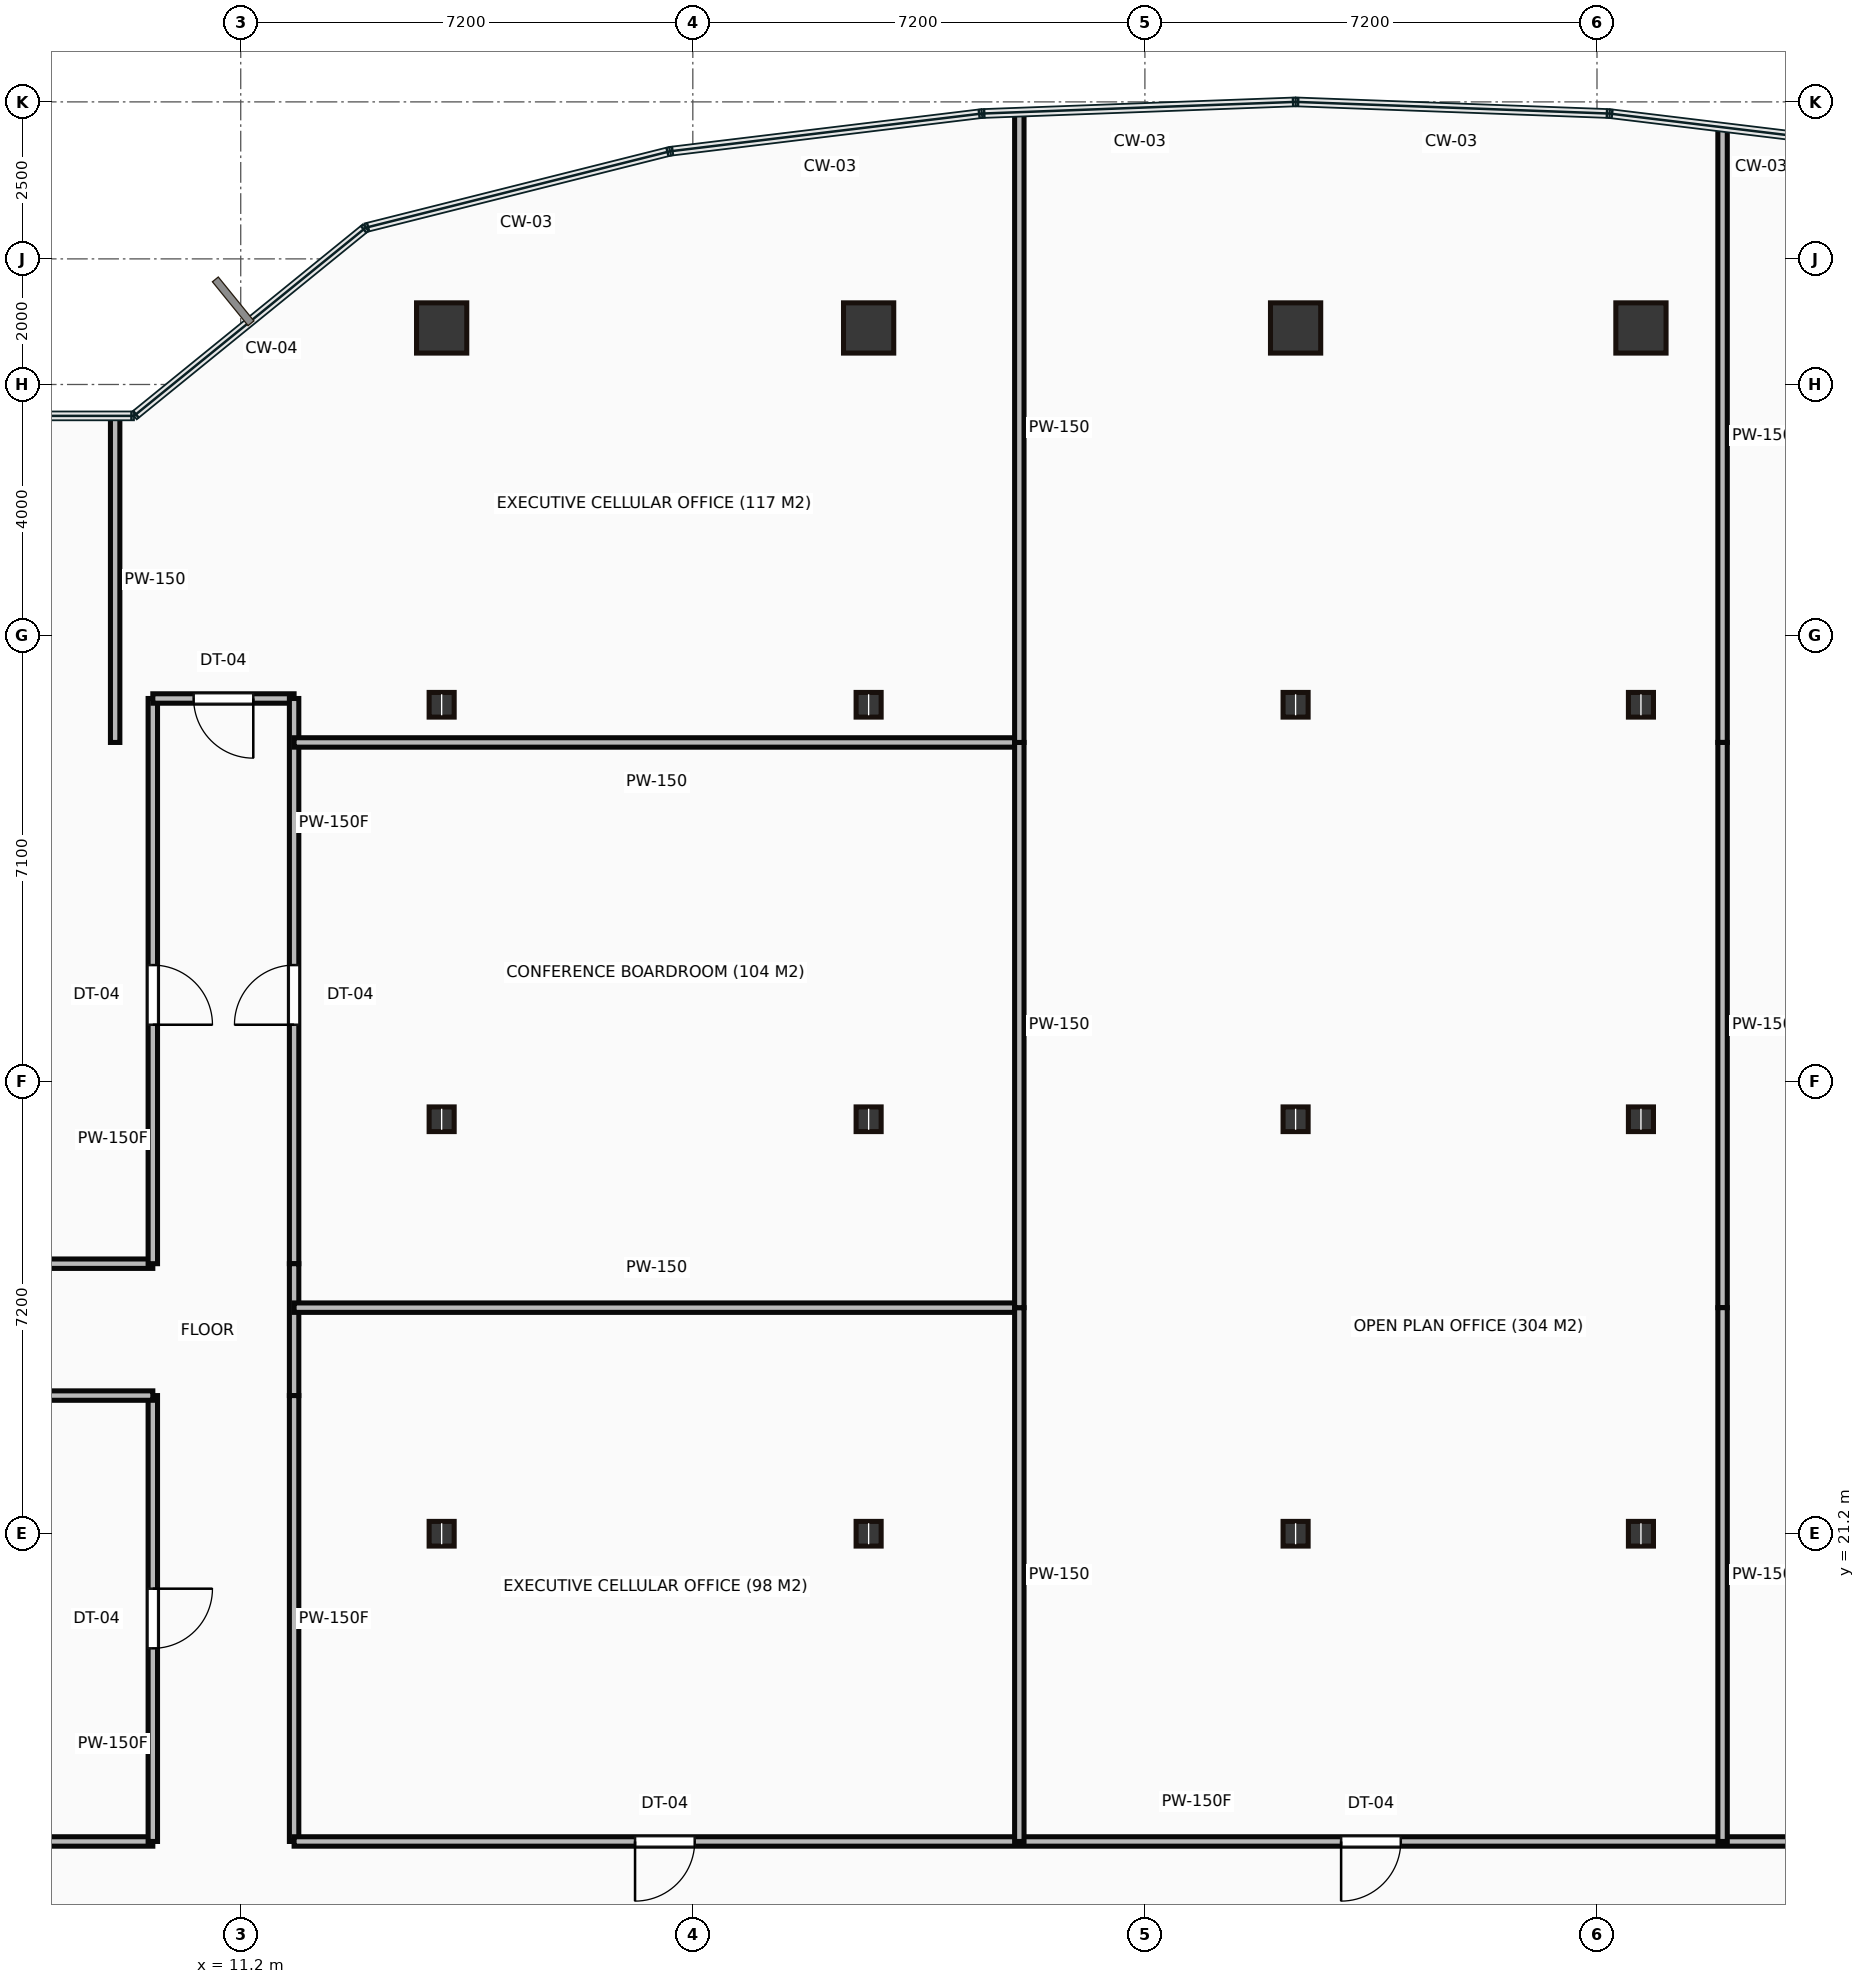
"""IFC4 building model, lengths in metres.
Left out: names, types, materials, properties, quantities, classifications, styles, units other than length and angle.
Written with IfcOpenShell. Run it as: python <this file> out.ifc"""

import sys

from ifc_helpers import new_model, si_unit, direction, frame, frame_2d, origin, origin_2d, place, context, subcontext, project, spatial, rectangle, hollow_rectangle, i_section, extrude, source, transform, mapped, element, fill, save


model = new_model("IFC4")
c1 = context("Model", 3, precision=1e-05, world=origin(), true_north=direction((0.0, 1.0)))
c2 = subcontext(c1, "Body", "Model", "MODEL_VIEW")
j1 = project(units=[si_unit("LENGTHUNIT", "METRE"), si_unit("PLANEANGLEUNIT", "RADIAN")], contexts=[c1])
p1 = place(None, origin())
s1 = spatial("IfcSite", under=j1, at=p1, CompositionType="ELEMENT")
p2 = place(p1, origin())
s2 = spatial("IfcBuilding", under=s1, at=p2, CompositionType="ELEMENT")
p3 = place(p2, frame((0.0, 0.0, 106.9)))
s3 = spatial("IfcBuildingStorey", under=s2, at=p3, CompositionType="ELEMENT", Elevation=106.9)
m1 = source(origin(), c2, "Body", "SweptSolid", [
    extrude(i_section(OverallWidth=0.399, OverallDepth=0.393, WebThickness=0.023, FlangeThickness=0.037, at=origin_2d()), origin(), (0.0, 0.0, 1.0), 3.65),
])
for number, where, z_axis, x_axis in (
    (1, (14.4, 21.2, 0.0), (0.0, 0.0, 1.0), (1.0, 0.0, 0.0)),
    (2, (14.4, 27.8, 0.0), (0.0, 0.0, 1.0), (1.0, 0.0, 0.0)),
    (3, (14.4, 34.4, 0.0), (0.0, 0.0, 1.0), (1.0, 0.0, 0.0)),
):
    element("IfcColumn", number, at=place(p3, frame(where, z_axis=z_axis, x_axis=x_axis)), inside=s3, PredefinedType="COLUMN", context=c2, shape_type="MappedRepresentation", body=[
        mapped(m1, transform((0.0, 0.0, 0.0))),
    ])
m2 = source(origin(), c2, "Body", "SweptSolid", [
    extrude(hollow_rectangle(XDim=0.8, YDim=0.8, WallThickness=0.04, at=origin_2d()), origin(), (0.0, 0.0, 1.0), 3.65),
])
p4 = place(p3, frame((14.4, 40.4, 0.0), z_axis=(0.0, 0.0, 1.0), x_axis=(1.0, 0.0, 0.0)))
e4 = element("IfcColumn", 4, at=p4, inside=s3, PredefinedType="COLUMN", context=c2, shape_type="MappedRepresentation", body=[
    mapped(m2, transform((0.0, 0.0, 0.0))),
])
for number, where, z_axis, x_axis in (
    (5, (21.2, 21.2, 0.0), (0.0, 0.0, 1.0), (1.0, 0.0, 0.0)),
    (6, (21.2, 27.8, 0.0), (0.0, 0.0, 1.0), (1.0, 0.0, 0.0)),
    (7, (21.2, 34.4, 0.0), (0.0, 0.0, 1.0), (1.0, 0.0, 0.0)),
):
    element("IfcColumn", number, at=place(p3, frame(where, z_axis=z_axis, x_axis=x_axis)), inside=s3, PredefinedType="COLUMN", context=c2, shape_type="MappedRepresentation", body=[
        mapped(m1, transform((0.0, 0.0, 0.0))),
    ])
p5 = place(p3, frame((21.2, 40.4, 0.0), z_axis=(0.0, 0.0, 1.0), x_axis=(1.0, 0.0, 0.0)))
e8 = element("IfcColumn", 8, at=p5, inside=s3, PredefinedType="COLUMN", context=c2, shape_type="MappedRepresentation", body=[
    mapped(m2, transform((0.0, 0.0, 0.0))),
])
for number, where, z_axis, x_axis in (
    (9, (28.0, 21.2, 0.0), (0.0, 0.0, 1.0), (1.0, 0.0, 0.0)),
    (10, (28.0, 27.8, 0.0), (0.0, 0.0, 1.0), (1.0, 0.0, 0.0)),
    (11, (28.0, 34.4, 0.0), (0.0, 0.0, 1.0), (1.0, 0.0, 0.0)),
):
    element("IfcColumn", number, at=place(p3, frame(where, z_axis=z_axis, x_axis=x_axis)), inside=s3, PredefinedType="COLUMN", context=c2, shape_type="MappedRepresentation", body=[
        mapped(m1, transform((0.0, 0.0, 0.0))),
    ])
p6 = place(p3, frame((28.0, 40.4, 0.0), z_axis=(0.0, 0.0, 1.0), x_axis=(1.0, 0.0, 0.0)))
e12 = element("IfcColumn", 12, at=p6, inside=s3, PredefinedType="COLUMN", context=c2, shape_type="MappedRepresentation", body=[
    mapped(m2, transform((0.0, 0.0, 0.0))),
])
for number, where, z_axis, x_axis in (
    (13, (33.5, 21.2, 0.0), (0.0, 0.0, 1.0), (1.0, 0.0, 0.0)),
    (14, (33.5, 27.8, 0.0), (0.0, 0.0, 1.0), (1.0, 0.0, 0.0)),
    (15, (33.5, 34.4, 0.0), (0.0, 0.0, 1.0), (1.0, 0.0, 0.0)),
):
    element("IfcColumn", number, at=place(p3, frame(where, z_axis=z_axis, x_axis=x_axis)), inside=s3, PredefinedType="COLUMN", context=c2, shape_type="MappedRepresentation", body=[
        mapped(m1, transform((0.0, 0.0, 0.0))),
    ])
p7 = place(p3, frame((33.5, 40.4, 0.0), z_axis=(0.0, 0.0, 1.0), x_axis=(1.0, 0.0, 0.0)))
e16 = element("IfcColumn", 16, at=p7, inside=s3, PredefinedType="COLUMN", context=c2, shape_type="MappedRepresentation", body=[
    mapped(m2, transform((0.0, 0.0, 0.0))),
])
m3 = source(origin(), c2, "Body", "SweptSolid", [
    extrude(rectangle(XDim=5.2, YDim=0.15, at=frame_2d((2.6, 0.0))), origin(), (0.0, 0.0, 1.0), 3.4),
])
p8 = place(p3, frame((4.6, 16.3, 0.0), z_axis=(0.0, 0.0, 1.0), x_axis=(1.0, 0.0, 0.0)))
e17 = element("IfcWall", 17, at=p8, inside=s3, PredefinedType="PARTITIONING", context=c2, shape_type="MappedRepresentation", body=[
    mapped(m3, transform((0.0, 0.0, 0.0))),
])
m4 = source(origin(), c2, "Body", "SweptSolid", [
    extrude(rectangle(XDim=7.1, YDim=0.15, at=frame_2d((3.55, 0.0))), origin(), (0.0, 0.0, 1.0), 3.4),
])
p9 = place(p3, frame((9.8, 16.3, 0.0), z_axis=(0.0, 0.0, 1.0), x_axis=(0.0, 1.0, 0.0)))
e18 = element("IfcWall", 18, at=p9, inside=s3, PredefinedType="PARTITIONING", context=c2, shape_type="MappedRepresentation", body=[
    mapped(m4, transform((0.0, 0.0, 0.0))),
])
p10 = place(p9, frame((3.075, 0.0, 0.0)))
e19 = element("IfcOpeningElement", 19, at=p10, cuts=e18, PredefinedType="OPENING", context=c2, shape_type="SweptSolid", body=[
    extrude(rectangle(XDim=0.95, YDim=2.15, at=frame_2d((0.475, 1.075))), frame((0.0, 0.085, 0.0), z_axis=(0.0, -1.0, 0.0), x_axis=(1.0, 0.0, 0.0)), (0.0, 0.0, 1.0), 0.17),
])
m5 = source(origin(), c2, "Body", "SweptSolid", [
    extrude(rectangle(XDim=5.2, YDim=0.15, at=frame_2d((2.6, 0.0))), origin(), (0.0, 0.0, 1.0), 2.988),
])
for number, where, z_axis, x_axis in (
    (20, (9.8, 23.4, 0.0), (0.0, 0.0, 1.0), (-1.0, 0.0, 0.0)),
    (21, (4.6, 25.5, 0.0), (0.0, 0.0, 1.0), (1.0, 0.0, 0.0)),
):
    element("IfcWall", number, at=place(p3, frame(where, z_axis=z_axis, x_axis=x_axis)), inside=s3, PredefinedType="PARTITIONING", context=c2, shape_type="MappedRepresentation", body=[
        mapped(m5, transform((0.0, 0.0, 0.0))),
    ])
m6 = source(origin(), c2, "Body", "SweptSolid", [
    extrude(rectangle(XDim=9.0, YDim=0.15, at=frame_2d((4.5, 0.0))), origin(), (0.0, 0.0, 1.0), 3.4),
])
p11 = place(p3, frame((9.8, 25.5, 0.0), z_axis=(0.0, 0.0, 1.0), x_axis=(0.0, 1.0, 0.0)))
e22 = element("IfcWall", 22, at=p11, inside=s3, PredefinedType="PARTITIONING", context=c2, shape_type="MappedRepresentation", body=[
    mapped(m6, transform((0.0, 0.0, 0.0))),
])
p12 = place(p11, frame((3.805, 0.0, 0.0)))
e23 = element("IfcOpeningElement", 23, at=p12, cuts=e22, PredefinedType="OPENING", context=c2, shape_type="SweptSolid", body=[
    extrude(rectangle(XDim=0.95, YDim=2.15, at=frame_2d((0.475, 1.075))), frame((0.0, 0.085, 0.0), z_axis=(0.0, -1.0, 0.0), x_axis=(1.0, 0.0, 0.0)), (0.0, 0.0, 1.0), 0.17),
])
m7 = source(origin(), c2, "Body", "SweptSolid", [
    extrude(rectangle(XDim=2.25, YDim=0.15, at=frame_2d((1.125, 0.0))), origin(), (0.0, 0.0, 1.0), 2.702),
])
p13 = place(p3, frame((9.8, 34.5, 0.0), z_axis=(0.0, 0.0, 1.0), x_axis=(1.0, 0.0, 0.0)))
e24 = element("IfcWall", 24, at=p13, inside=s3, PredefinedType="PARTITIONING", context=c2, shape_type="MappedRepresentation", body=[
    mapped(m7, transform((0.0, 0.0, 0.0))),
])
p14 = place(p13, frame((0.65, 0.0, 0.0)))
e25 = element("IfcOpeningElement", 25, at=p14, cuts=e24, PredefinedType="OPENING", context=c2, shape_type="SweptSolid", body=[
    extrude(rectangle(XDim=0.95, YDim=2.15, at=frame_2d((0.475, 1.075))), frame((0.0, 0.085, 0.0), z_axis=(0.0, -1.0, 0.0), x_axis=(1.0, 0.0, 0.0)), (0.0, 0.0, 1.0), 0.17),
])
p15 = place(p3, frame((12.05, 34.5, 0.0), z_axis=(0.0, 0.0, 1.0), x_axis=(0.0, -1.0, 0.0)))
e26 = element("IfcWall", 26, at=p15, inside=s3, PredefinedType="PARTITIONING", context=c2, shape_type="MappedRepresentation", body=[
    mapped(m6, transform((0.0, 0.0, 0.0))),
])
p16 = place(p15, frame((4.245, 0.0, 0.0)))
e27 = element("IfcOpeningElement", 27, at=p16, cuts=e26, PredefinedType="OPENING", context=c2, shape_type="SweptSolid", body=[
    extrude(rectangle(XDim=0.95, YDim=2.15, at=frame_2d((0.475, 1.075))), frame((0.0, 0.085, 0.0), z_axis=(0.0, -1.0, 0.0), x_axis=(1.0, 0.0, 0.0)), (0.0, 0.0, 1.0), 0.17),
])
m8 = source(origin(), c2, "Body", "SweptSolid", [
    extrude(rectangle(XDim=2.1, YDim=0.15, at=frame_2d((1.05, 0.0))), origin(), (0.0, 0.0, 1.0), 3.4),
])
p17 = place(p3, frame((12.05, 25.5, 0.0), z_axis=(0.0, 0.0, 1.0), x_axis=(0.0, -1.0, 0.0)))
e28 = element("IfcWall", 28, at=p17, inside=s3, PredefinedType="PARTITIONING", context=c2, shape_type="MappedRepresentation", body=[
    mapped(m8, transform((0.0, 0.0, 0.0))),
])
p18 = place(p3, frame((12.05, 23.4, 0.0), z_axis=(0.0, 0.0, 1.0), x_axis=(0.0, -1.0, 0.0)))
e29 = element("IfcWall", 29, at=p18, inside=s3, PredefinedType="PARTITIONING", context=c2, shape_type="MappedRepresentation", body=[
    mapped(m4, transform((0.0, 0.0, 0.0))),
])
m9 = source(origin(), c2, "Body", "SweptSolid", [
    extrude(rectangle(XDim=28.75, YDim=0.15, at=frame_2d((14.375, 0.0))), origin(), (0.0, 0.0, 1.0), 3.4),
])
p19 = place(p3, frame((12.05, 16.3, 0.0), z_axis=(0.0, 0.0, 1.0), x_axis=(1.0, 0.0, 0.0)))
e30 = element("IfcWall", 30, at=p19, inside=s3, PredefinedType="PARTITIONING", context=c2, shape_type="MappedRepresentation", body=[
    mapped(m9, transform((0.0, 0.0, 0.0))),
])
p20 = place(p19, frame((5.43, 0.0, 0.0)))
e31 = element("IfcOpeningElement", 31, at=p20, cuts=e30, PredefinedType="OPENING", context=c2, shape_type="SweptSolid", body=[
    extrude(rectangle(XDim=0.95, YDim=2.15, at=frame_2d((0.475, 1.075))), frame((0.0, 0.085, 0.0), z_axis=(0.0, -1.0, 0.0), x_axis=(1.0, 0.0, 0.0)), (0.0, 0.0, 1.0), 0.17),
])
p21 = place(p19, frame((16.675, 0.0, 0.0)))
e32 = element("IfcOpeningElement", 32, at=p21, cuts=e30, PredefinedType="OPENING", context=c2, shape_type="SweptSolid", body=[
    extrude(rectangle(XDim=0.95, YDim=2.15, at=frame_2d((0.475, 1.075))), frame((0.0, 0.085, 0.0), z_axis=(0.0, -1.0, 0.0), x_axis=(1.0, 0.0, 0.0)), (0.0, 0.0, 1.0), 0.17),
])
p22 = place(p19, frame((25.145, 0.0, 0.0)))
e33 = element("IfcOpeningElement", 33, at=p22, cuts=e30, PredefinedType="OPENING", context=c2, shape_type="SweptSolid", body=[
    extrude(rectangle(XDim=0.95, YDim=2.15, at=frame_2d((0.475, 1.075))), frame((0.0, 0.085, 0.0), z_axis=(0.0, -1.0, 0.0), x_axis=(1.0, 0.0, 0.0)), (0.0, 0.0, 1.0), 0.17),
])
m10 = source(origin(), c2, "Body", "SweptSolid", [
    extrude(rectangle(XDim=5.18, YDim=0.15, at=frame_2d((2.59, 0.0))), origin(), (0.0, 0.0, 1.0), 3.4),
])
p23 = place(p3, frame((9.2, 38.98, 0.0), z_axis=(0.0, 0.0, 1.0), x_axis=(0.0, -1.0, 0.0)))
e34 = element("IfcWall", 34, at=p23, inside=s3, PredefinedType="PARTITIONING", context=c2, shape_type="MappedRepresentation", body=[
    mapped(m10, transform((0.0, 0.0, 0.0))),
])
m11 = source(origin(), c2, "Body", "SweptSolid", [
    extrude(rectangle(XDim=11.55, YDim=0.15, at=frame_2d((5.775, 0.0))), origin(), (0.0, 0.0, 1.0), 3.4),
])
for number, where, z_axis, x_axis in (
    (35, (12.05, 24.8, 0.0), (0.0, 0.0, 1.0), (1.0, 0.0, 0.0)),
    (36, (23.6, 33.8, 0.0), (0.0, 0.0, 1.0), (-1.0, 0.0, 0.0)),
):
    element("IfcWall", number, at=place(p3, frame(where, z_axis=z_axis, x_axis=x_axis)), inside=s3, PredefinedType="PARTITIONING", context=c2, shape_type="MappedRepresentation", body=[
        mapped(m11, transform((0.0, 0.0, 0.0))),
    ])
m12 = source(origin(), c2, "Body", "SweptSolid", [
    extrude(rectangle(XDim=8.5, YDim=0.15, at=frame_2d((4.25, 0.0))), origin(), (0.0, 0.0, 1.0), 3.4),
])
p24 = place(p3, frame((23.6, 24.8, 0.0), z_axis=(0.0, 0.0, 1.0), x_axis=(0.0, -1.0, 0.0)))
e37 = element("IfcWall", 37, at=p24, inside=s3, PredefinedType="PARTITIONING", context=c2, shape_type="MappedRepresentation", body=[
    mapped(m12, transform((0.0, 0.0, 0.0))),
])
p25 = place(p3, frame((23.6, 33.8, 0.0), z_axis=(0.0, 0.0, 1.0), x_axis=(0.0, -1.0, 0.0)))
e38 = element("IfcWall", 38, at=p25, inside=s3, PredefinedType="PARTITIONING", context=c2, shape_type="MappedRepresentation", body=[
    mapped(m6, transform((0.0, 0.0, 0.0))),
])
m13 = source(origin(), c2, "Body", "SweptSolid", [
    extrude(rectangle(XDim=10.016, YDim=0.15, at=frame_2d((5.008, 0.0))), origin(), (0.0, 0.0, 1.0), 3.4),
])
p26 = place(p3, frame((23.6, 43.816, 0.0), z_axis=(0.0, 0.0, 1.0), x_axis=(0.0, -1.0, 0.0)))
e39 = element("IfcWall", 39, at=p26, inside=s3, PredefinedType="PARTITIONING", context=c2, shape_type="MappedRepresentation", body=[
    mapped(m13, transform((0.0, 0.0, 0.0))),
])
m14 = source(origin(), c2, "Body", "SweptSolid", [
    extrude(rectangle(XDim=9.776, YDim=0.15, at=frame_2d((4.888, 0.0))), origin(), (0.0, 0.0, 1.0), 3.4),
])
p27 = place(p3, frame((34.8, 43.576, 0.0), z_axis=(0.0, 0.0, 1.0), x_axis=(0.0, -1.0, 0.0)))
e40 = element("IfcWall", 40, at=p27, inside=s3, PredefinedType="PARTITIONING", context=c2, shape_type="MappedRepresentation", body=[
    mapped(m14, transform((0.0, 0.0, 0.0))),
])
p28 = place(p3, frame((34.8, 33.8, 0.0), z_axis=(0.0, 0.0, 1.0), x_axis=(0.0, -1.0, 0.0)))
e41 = element("IfcWall", 41, at=p28, inside=s3, PredefinedType="PARTITIONING", context=c2, shape_type="MappedRepresentation", body=[
    mapped(m6, transform((0.0, 0.0, 0.0))),
])
p29 = place(p3, frame((34.8, 24.8, 0.0), z_axis=(0.0, 0.0, 1.0), x_axis=(0.0, -1.0, 0.0)))
e42 = element("IfcWall", 42, at=p29, inside=s3, PredefinedType="PARTITIONING", context=c2, shape_type="MappedRepresentation", body=[
    mapped(m12, transform((0.0, 0.0, 0.0))),
])
m15 = source(origin(), c2, "Body", "SweptSolid", [
    extrude(rectangle(XDim=0.95, YDim=2.15, at=frame_2d((0.475, 1.075))), frame((0.0, 0.025, 0.0), z_axis=(0.0, -1.0, 0.0), x_axis=(1.0, 0.0, 0.0)), (0.0, 0.0, 1.0), 0.05),
])
p30 = place(p10, origin())
e43 = element("IfcDoor", 43, at=p30, inside=s3, OperationType="SINGLE_SWING_RIGHT", PredefinedType="DOOR", context=c2, shape_type="MappedRepresentation", body=[
    mapped(m15, transform((0.0, 0.0, 0.0))),
])
fill(e19, e43)
p31 = place(p12, origin())
e44 = element("IfcDoor", 44, at=p31, inside=s3, OperationType="SINGLE_SWING_LEFT", PredefinedType="DOOR", context=c2, shape_type="MappedRepresentation", body=[
    mapped(m15, transform((0.0, 0.0, 0.0))),
])
fill(e23, e44)
p32 = place(p14, origin())
e45 = element("IfcDoor", 45, at=p32, inside=s3, OperationType="SINGLE_SWING_RIGHT", PredefinedType="DOOR", context=c2, shape_type="MappedRepresentation", body=[
    mapped(m15, transform((0.0, 0.0, 0.0))),
])
fill(e25, e45)
p33 = place(p20, origin())
e46 = element("IfcDoor", 46, at=p33, inside=s3, OperationType="SINGLE_SWING_LEFT", PredefinedType="DOOR", context=c2, shape_type="MappedRepresentation", body=[
    mapped(m15, transform((0.0, 0.0, 0.0))),
])
fill(e31, e46)
p34 = place(p16, origin())
e47 = element("IfcDoor", 47, at=p34, inside=s3, OperationType="SINGLE_SWING_RIGHT", PredefinedType="DOOR", context=c2, shape_type="MappedRepresentation", body=[
    mapped(m15, transform((0.0, 0.0, 0.0))),
])
fill(e27, e47)
p35 = place(p21, origin())
e48 = element("IfcDoor", 48, at=p35, inside=s3, OperationType="SINGLE_SWING_LEFT", PredefinedType="DOOR", context=c2, shape_type="MappedRepresentation", body=[
    mapped(m15, transform((0.0, 0.0, 0.0))),
])
fill(e32, e48)
save(model, sys.argv[1])
